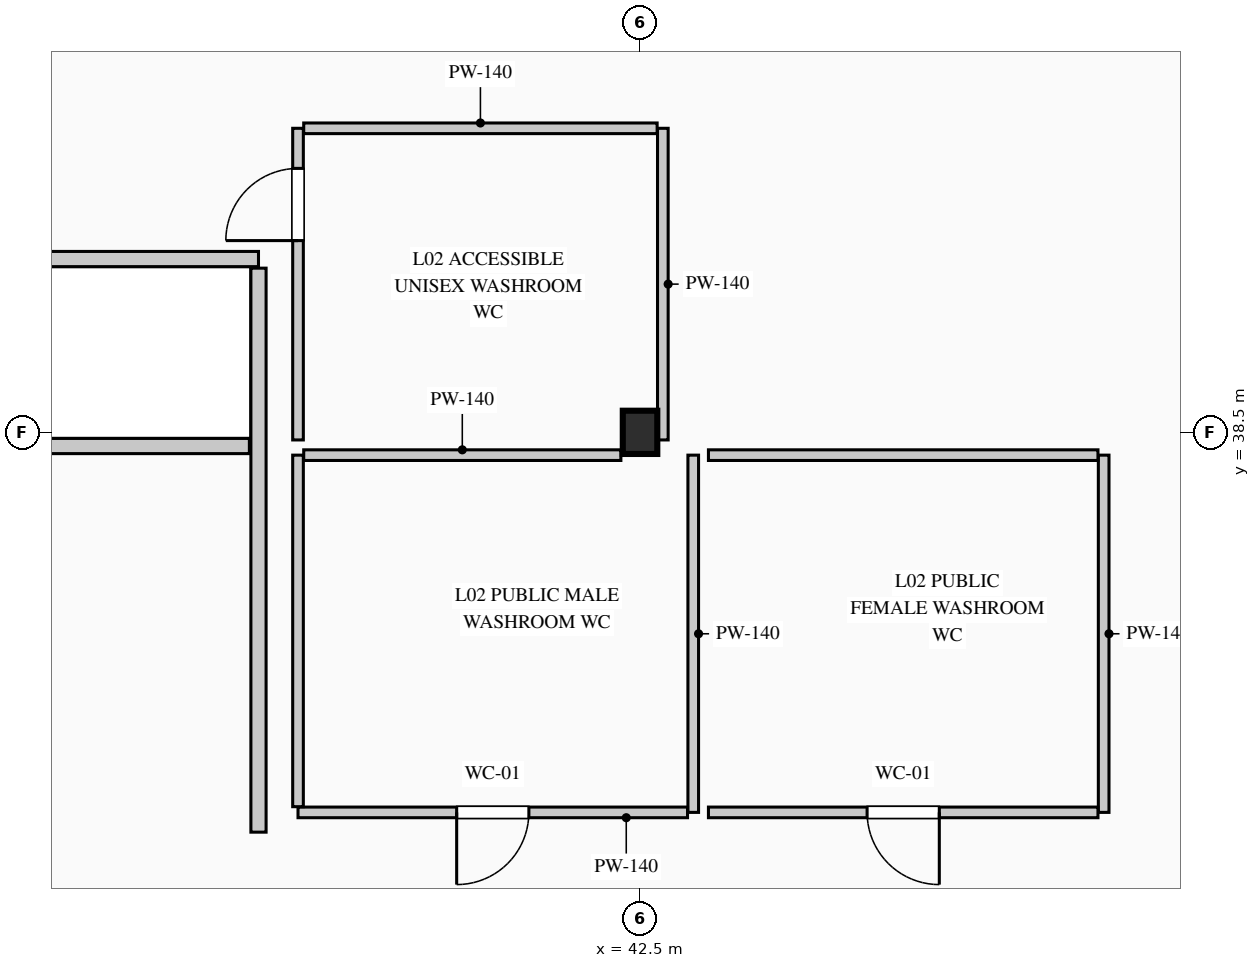
"""IFC4 building model, lengths in metres.
Left out: names, types, materials, properties, quantities, classifications, styles, units other than length and angle.
Written with IfcOpenShell. Run it as: python <this file> out.ifc"""

import sys

from ifc_helpers import new_model, si_unit, direction, frame, frame_2d, origin, origin_2d, place, context, subcontext, project, spatial, rectangle, i_section, extrude, element, fill, save


model = new_model("IFC4")
c1 = context("Model", 3, precision=1e-05, world=origin(), true_north=direction((0.0, 1.0)))
c2 = subcontext(c1, "Body", "Model", "MODEL_VIEW")
j1 = project(units=[si_unit("LENGTHUNIT", "METRE"), si_unit("PLANEANGLEUNIT", "RADIAN")], contexts=[c1])
p1 = place(None, origin())
s1 = spatial("IfcSite", under=j1, at=p1, CompositionType="ELEMENT")
p2 = place(p1, origin())
s2 = spatial("IfcBuilding", under=s1, at=p2, CompositionType="ELEMENT")
p3 = place(p2, frame((0.0, 0.0, 5.4)))
s3 = spatial("IfcBuildingStorey", under=s2, at=p3, CompositionType="ELEMENT", Elevation=5.4)
p4 = place(p3, frame((42.5, 38.5, 0.0), z_axis=(0.0, 0.0, 1.0), x_axis=(1.0, 0.0, 0.0)))
e1 = element("IfcColumn", 1, at=p4, inside=s3, PredefinedType="COLUMN", context=c2, shape_type="SweptSolid", body=[
    extrude(i_section(OverallWidth=0.454, OverallDepth=0.569, WebThickness=0.078, FlangeThickness=0.08, FilletRadius=0.015, at=origin_2d()), origin(), (0.0, 0.0, 1.0), 5.4),
])
p5 = place(p3, frame((30.5, 40.78, 0.0), z_axis=(0.0, 0.0, 1.0), x_axis=(1.0, 0.0, 0.0)))
e2 = element("IfcWall", 2, at=p5, inside=s3, PredefinedType="PARTITIONING", context=c2, shape_type="SweptSolid", body=[
    extrude(rectangle(XDim=6.98, YDim=0.2, at=frame_2d((3.49, 0.0))), origin(), (0.0, 0.0, 1.0), 5.08),
])
p6 = place(p3, frame((37.48, 33.24, 0.0), z_axis=(0.0, 0.0, 1.0), x_axis=(0.0, 1.0, 0.0)))
e3 = element("IfcWall", 3, at=p6, inside=s3, PredefinedType="PARTITIONING", context=c2, shape_type="SweptSolid", body=[
    extrude(rectangle(XDim=7.42, YDim=0.2, at=frame_2d((3.71, 0.0))), origin(), (0.0, 0.0, 1.0), 5.08),
])
p7 = place(p3, frame((30.5, 38.32, 0.0), z_axis=(0.0, 0.0, 1.0), x_axis=(1.0, 0.0, 0.0)))
e4 = element("IfcWall", 4, at=p7, inside=s3, PredefinedType="PARTITIONING", context=c2, shape_type="SweptSolid", body=[
    extrude(rectangle(XDim=6.86, YDim=0.2, at=frame_2d((3.43, 0.0))), origin(), (0.0, 0.0, 1.0), 5.08),
])
p8 = place(p3, frame((43.2, 38.2, 0.0), z_axis=(0.0, 0.0, 1.0), x_axis=(0.0, -1.0, 0.0)))
e5 = element("IfcWall", 5, at=p8, inside=s3, PredefinedType="PARTITIONING", context=c2, shape_type="SweptSolid", body=[
    extrude(rectangle(XDim=4.7, YDim=0.14, at=frame_2d((2.35, 0.0))), origin(), (0.0, 0.0, 1.0), 4.615),
])
p9 = place(p3, frame((43.125, 33.5, 0.0), z_axis=(0.0, 0.0, 1.0), x_axis=(-1.0, 0.0, 0.0)))
e6 = element("IfcWall", 6, at=p9, inside=s3, PredefinedType="PARTITIONING", context=c2, shape_type="SweptSolid", body=[
    extrude(rectangle(XDim=5.125, YDim=0.14, at=frame_2d((2.562, 0.0))), origin(), (0.0, 0.0, 1.0), 5.08),
])
p10 = place(p9, frame((2.087, 0.0, 0.0)))
e7 = element("IfcOpeningElement", 7, at=p10, cuts=e6, PredefinedType="OPENING", context=c2, shape_type="SweptSolid", body=[
    extrude(rectangle(XDim=0.95, YDim=2.15, at=frame_2d((0.475, 1.075))), frame((0.0, 0.08, 0.0), z_axis=(0.0, -1.0, 0.0), x_axis=(1.0, 0.0, 0.0)), (0.0, 0.0, 1.0), 0.16),
])
p11 = place(p3, frame((38.0, 33.575, 0.0), z_axis=(0.0, 0.0, 1.0), x_axis=(0.0, 1.0, 0.0)))
e8 = element("IfcWall", 8, at=p11, inside=s3, PredefinedType="PARTITIONING", context=c2, shape_type="SweptSolid", body=[
    extrude(rectangle(XDim=4.625, YDim=0.14, at=frame_2d((2.312, 0.0))), origin(), (0.0, 0.0, 1.0), 5.08),
])
p12 = place(p3, frame((38.075, 38.2, 0.0), z_axis=(0.0, 0.0, 1.0), x_axis=(1.0, 0.0, 0.0)))
e9 = element("IfcWall", 9, at=p12, inside=s3, PredefinedType="PARTITIONING", context=c2, shape_type="SweptSolid", body=[
    extrude(rectangle(XDim=4.173, YDim=0.14, at=frame_2d((2.086, 0.0))), origin(), (0.0, 0.0, 1.0), 5.08),
])
p13 = place(p3, frame((48.6, 38.2, 0.0), z_axis=(0.0, 0.0, 1.0), x_axis=(0.0, -1.0, 0.0)))
e10 = element("IfcWall", 10, at=p13, inside=s3, PredefinedType="PARTITIONING", context=c2, shape_type="SweptSolid", body=[
    extrude(rectangle(XDim=4.7, YDim=0.14, at=frame_2d((2.35, 0.0))), origin(), (0.0, 0.0, 1.0), 5.08),
])
p14 = place(p3, frame((48.525, 33.5, 0.0), z_axis=(0.0, 0.0, 1.0), x_axis=(-1.0, 0.0, 0.0)))
e11 = element("IfcWall", 11, at=p14, inside=s3, PredefinedType="PARTITIONING", context=c2, shape_type="SweptSolid", body=[
    extrude(rectangle(XDim=5.125, YDim=0.14, at=frame_2d((2.562, 0.0))), origin(), (0.0, 0.0, 1.0), 5.08),
])
p15 = place(p14, frame((2.087, 0.0, 0.0)))
e12 = element("IfcOpeningElement", 12, at=p15, cuts=e11, PredefinedType="OPENING", context=c2, shape_type="SweptSolid", body=[
    extrude(rectangle(XDim=0.95, YDim=2.15, at=frame_2d((0.475, 1.075))), frame((0.0, 0.08, 0.0), z_axis=(0.0, -1.0, 0.0), x_axis=(1.0, 0.0, 0.0)), (0.0, 0.0, 1.0), 0.16),
])
p16 = place(p3, frame((43.4, 38.2, 0.0), z_axis=(0.0, 0.0, 1.0), x_axis=(1.0, 0.0, 0.0)))
e13 = element("IfcWall", 13, at=p16, inside=s3, PredefinedType="PARTITIONING", context=c2, shape_type="SweptSolid", body=[
    extrude(rectangle(XDim=5.125, YDim=0.14, at=frame_2d((2.562, 0.0))), origin(), (0.0, 0.0, 1.0), 5.08),
])
p17 = place(p3, frame((42.8, 42.5, 0.0), z_axis=(0.0, 0.0, 1.0), x_axis=(0.0, -1.0, 0.0)))
e14 = element("IfcWall", 14, at=p17, inside=s3, PredefinedType="PARTITIONING", context=c2, shape_type="SweptSolid", body=[
    extrude(rectangle(XDim=4.1, YDim=0.14, at=frame_2d((2.05, 0.0))), origin(), (0.0, 0.0, 1.0), 5.08),
])
p18 = place(p3, frame((38.0, 38.4, 0.0), z_axis=(0.0, 0.0, 1.0), x_axis=(0.0, 1.0, 0.0)))
e15 = element("IfcWall", 15, at=p18, inside=s3, PredefinedType="PARTITIONING", context=c2, shape_type="SweptSolid", body=[
    extrude(rectangle(XDim=4.1, YDim=0.14, at=frame_2d((2.05, 0.0))), origin(), (0.0, 0.0, 1.0), 5.08),
])
p19 = place(p18, frame((2.623, 0.0, 0.0)))
e16 = element("IfcOpeningElement", 16, at=p19, cuts=e15, PredefinedType="OPENING", context=c2, shape_type="SweptSolid", body=[
    extrude(rectangle(XDim=0.95, YDim=2.15, at=frame_2d((0.475, 1.075))), frame((0.0, 0.08, 0.0), z_axis=(0.0, -1.0, 0.0), x_axis=(1.0, 0.0, 0.0)), (0.0, 0.0, 1.0), 0.16),
])
p20 = place(p3, frame((38.075, 42.5, 0.0), z_axis=(0.0, 0.0, 1.0), x_axis=(1.0, 0.0, 0.0)))
e17 = element("IfcWall", 17, at=p20, inside=s3, PredefinedType="PARTITIONING", context=c2, shape_type="SweptSolid", body=[
    extrude(rectangle(XDim=4.65, YDim=0.14, at=frame_2d((2.325, 0.0))), origin(), (0.0, 0.0, 1.0), 5.08),
])
p21 = place(p10, origin())
e18 = element("IfcDoor", 18, at=p21, inside=s3, OperationType="SINGLE_SWING_RIGHT", PredefinedType="DOOR", context=c2, shape_type="SweptSolid", body=[
    extrude(rectangle(XDim=0.95, YDim=2.15, at=frame_2d((0.475, 1.075))), frame((0.0, 0.025, 0.0), z_axis=(0.0, -1.0, 0.0), x_axis=(1.0, 0.0, 0.0)), (0.0, 0.0, 1.0), 0.05),
])
fill(e7, e18)
p22 = place(p15, origin())
e19 = element("IfcDoor", 19, at=p22, inside=s3, OperationType="SINGLE_SWING_LEFT", PredefinedType="DOOR", context=c2, shape_type="SweptSolid", body=[
    extrude(rectangle(XDim=0.95, YDim=2.15, at=frame_2d((0.475, 1.075))), frame((0.0, 0.025, 0.0), z_axis=(0.0, -1.0, 0.0), x_axis=(1.0, 0.0, 0.0)), (0.0, 0.0, 1.0), 0.05),
])
fill(e12, e19)
p23 = place(p19, origin())
e20 = element("IfcDoor", 20, at=p23, inside=s3, OperationType="SINGLE_SWING_LEFT", PredefinedType="DOOR", context=c2, shape_type="SweptSolid", body=[
    extrude(rectangle(XDim=0.95, YDim=2.15, at=frame_2d((0.475, 1.075))), frame((0.0, 0.025, 0.0), z_axis=(0.0, -1.0, 0.0), x_axis=(1.0, 0.0, 0.0)), (0.0, 0.0, 1.0), 0.05),
])
fill(e16, e20)
save(model, sys.argv[1])
